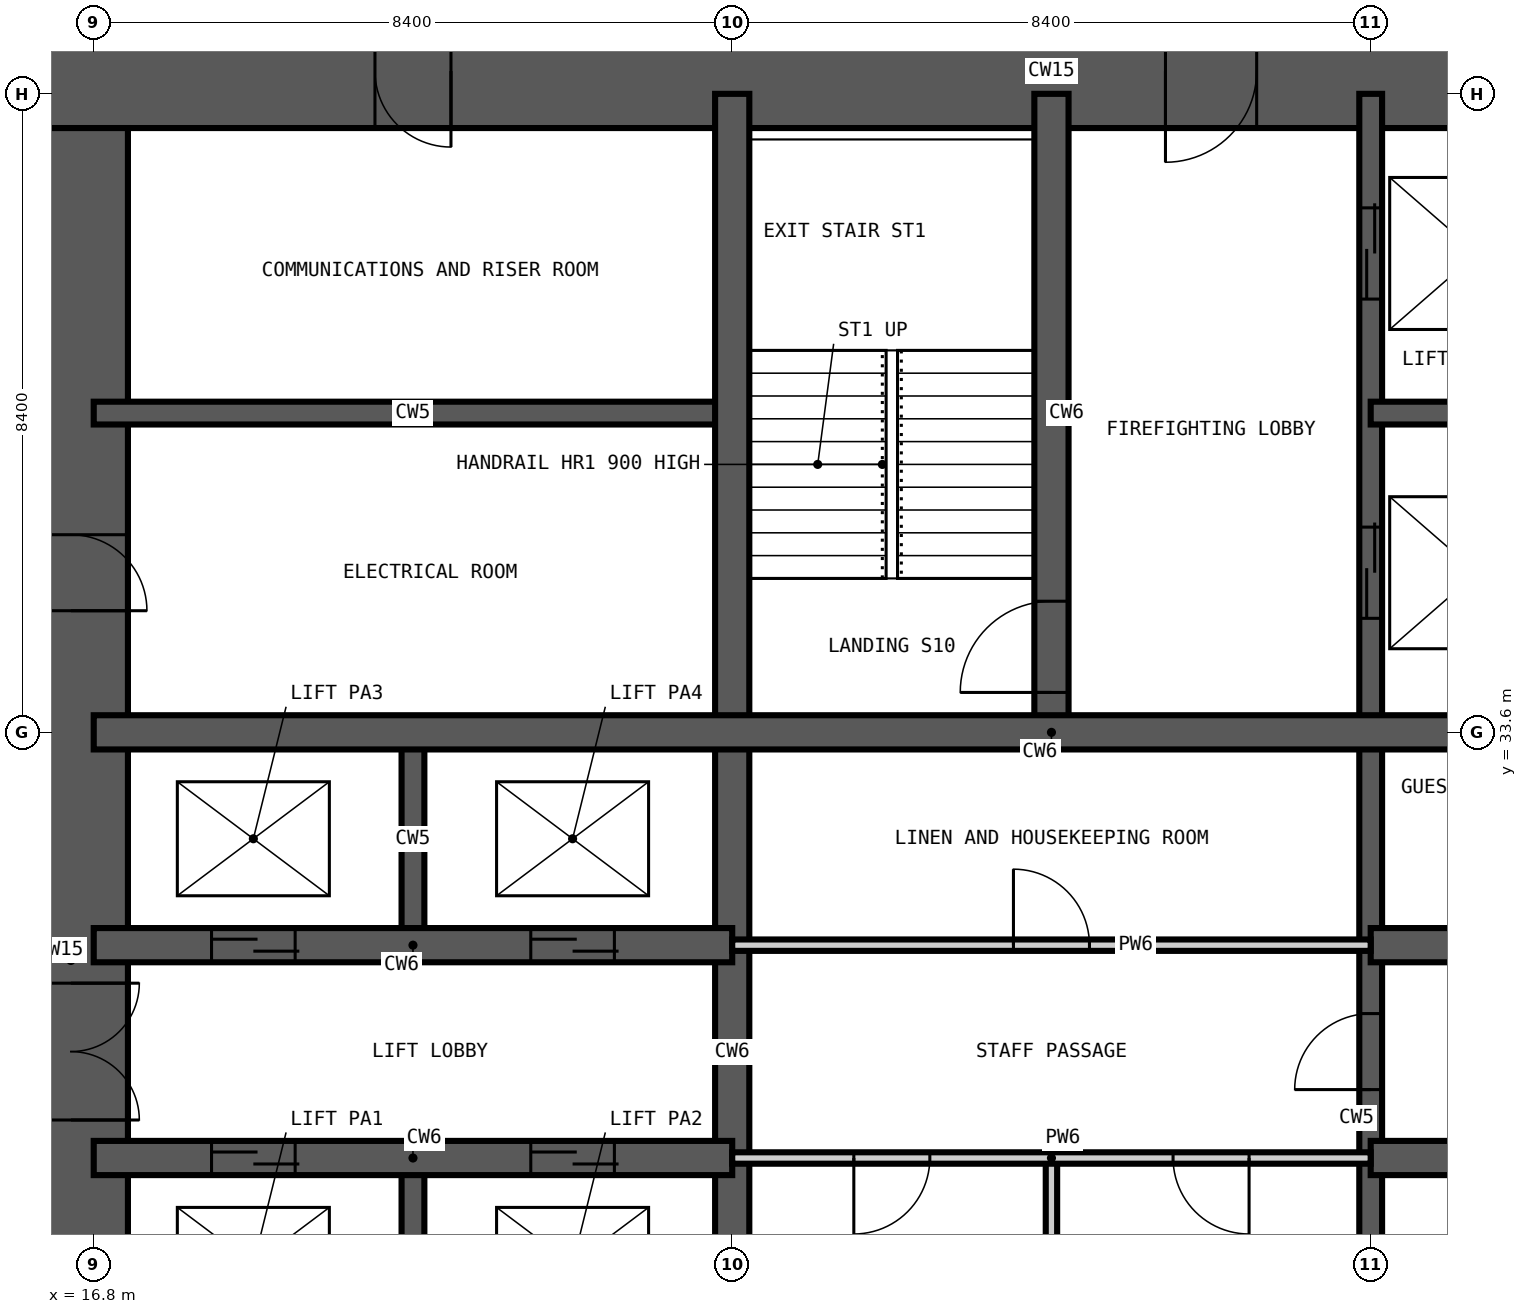
"""IFC4 building model, lengths in metres.
Left out: names, types, materials, properties, quantities, classifications, styles, units other than length and angle.
Written with IfcOpenShell. Run it as: python <this file> out.ifc"""

import sys

from ifc_helpers import new_model, si_unit, direction, frame, frame_2d, origin, place, context, subcontext, project, spatial, rectangle, extrude, element, fill, save


model = new_model("IFC4")
c1 = context("Model", 3, precision=1e-05, world=origin(), true_north=direction((0.0, 1.0)))
c2 = subcontext(c1, "Body", "Model", "MODEL_VIEW")
j1 = project(units=[si_unit("LENGTHUNIT", "METRE"), si_unit("PLANEANGLEUNIT", "RADIAN")], contexts=[c1])
p1 = place(None, origin())
s1 = spatial("IfcSite", under=j1, at=p1, CompositionType="ELEMENT")
p2 = place(p1, origin())
s2 = spatial("IfcBuilding", under=s1, at=p2, CompositionType="ELEMENT")
p3 = place(p2, frame((0.0, 0.0, 70.2)))
s3 = spatial("IfcBuildingStorey", under=s2, at=p3, CompositionType="ELEMENT", Elevation=70.2)
p4 = place(p3, frame((43.05, 42.3, -0.35), z_axis=(0.0, 0.0, 1.0), x_axis=(-1.0, 0.0, 0.0)))
e1 = element("IfcWall", 1, at=p4, inside=s3, PredefinedType="SHEAR", context=c2, shape_type="SweptSolid", body=[
    extrude(rectangle(XDim=27.3, YDim=1.5, at=frame_2d((13.65, 0.0))), origin(), (0.0, 0.0, 1.0), 3.6),
])
p5 = place(p4, frame((21.55, 0.0, 0.35)))
e2 = element("IfcOpeningElement", 2, at=p5, cuts=e1, PredefinedType="OPENING", context=c2, shape_type="SweptSolid", body=[
    extrude(rectangle(XDim=1.0, YDim=2.1, at=frame_2d((0.5, 1.05))), frame((0.0, 0.76, 0.0), z_axis=(0.0, -1.0, 0.0), x_axis=(1.0, 0.0, 0.0)), (0.0, 0.0, 1.0), 1.52),
])
p6 = place(p4, frame((10.95, 0.0, 0.35)))
e3 = element("IfcOpeningElement", 3, at=p6, cuts=e1, PredefinedType="OPENING", context=c2, shape_type="SweptSolid", body=[
    extrude(rectangle(XDim=1.2, YDim=2.2, at=frame_2d((0.6, 1.1))), frame((0.0, 0.76, 0.0), z_axis=(0.0, -1.0, 0.0), x_axis=(1.0, 0.0, 0.0)), (0.0, 0.0, 1.0), 1.52),
])
p7 = place(p3, frame((16.5, 41.55, -0.35), z_axis=(0.0, 0.0, 1.0), x_axis=(0.0, -1.0, 0.0)))
e4 = element("IfcWall", 4, at=p7, inside=s3, PredefinedType="SHEAR", context=c2, shape_type="SweptSolid", body=[
    extrude(rectangle(XDim=24.3, YDim=1.5, at=frame_2d((12.15, 0.0))), origin(), (0.0, 0.0, 1.0), 3.6),
])
p8 = place(p7, frame((11.25, 0.0, 0.35)))
e5 = element("IfcOpeningElement", 5, at=p8, cuts=e4, PredefinedType="OPENING", context=c2, shape_type="SweptSolid", body=[
    extrude(rectangle(XDim=1.8, YDim=2.2, at=frame_2d((0.9, 1.1))), frame((0.0, 0.76, 0.0), z_axis=(0.0, -1.0, 0.0), x_axis=(1.0, 0.0, 0.0)), (0.0, 0.0, 1.0), 1.52),
])
p9 = place(p7, frame((20.05, 0.0, 0.35)))
e6 = element("IfcOpeningElement", 6, at=p9, cuts=e4, PredefinedType="OPENING", context=c2, shape_type="SweptSolid", body=[
    extrude(rectangle(XDim=1.0, YDim=2.1, at=frame_2d((0.5, 1.05))), frame((0.0, 0.76, 0.0), z_axis=(0.0, -1.0, 0.0), x_axis=(1.0, 0.0, 0.0)), (0.0, 0.0, 1.0), 1.52),
])
p10 = place(p7, frame((5.35, 0.0, 0.35)))
e7 = element("IfcOpeningElement", 7, at=p10, cuts=e4, PredefinedType="OPENING", context=c2, shape_type="SweptSolid", body=[
    extrude(rectangle(XDim=1.0, YDim=2.1, at=frame_2d((0.5, 1.05))), frame((0.0, 0.76, 0.0), z_axis=(0.0, -1.0, 0.0), x_axis=(1.0, 0.0, 0.0)), (0.0, 0.0, 1.0), 1.52),
])
p11 = place(p3, frame((21.0, 22.4, -0.35), z_axis=(0.0, 0.0, 1.0), x_axis=(0.0, 1.0, 0.0)))
e8 = element("IfcWall", 8, at=p11, inside=s3, PredefinedType="SHEAR", context=c2, shape_type="SweptSolid", body=[
    extrude(rectangle(XDim=5.6, YDim=0.3, at=frame_2d((2.8, 0.0))), origin(), (0.0, 0.0, 1.0), 3.6),
])
p12 = place(p3, frame((21.0, 30.8, -0.35), z_axis=(0.0, 0.0, 1.0), x_axis=(0.0, 1.0, 0.0)))
e9 = element("IfcWall", 9, at=p12, inside=s3, PredefinedType="SHEAR", context=c2, shape_type="SweptSolid", body=[
    extrude(rectangle(XDim=2.8, YDim=0.3, at=frame_2d((1.4, 0.0))), origin(), (0.0, 0.0, 1.0), 3.6),
])
p13 = place(p3, frame((33.6, 16.8, -0.35), z_axis=(0.0, 0.0, 1.0), x_axis=(0.0, 1.0, 0.0)))
e10 = element("IfcWall", 10, at=p13, inside=s3, PredefinedType="SHEAR", context=c2, shape_type="SweptSolid", body=[
    extrude(rectangle(XDim=25.2, YDim=0.3, at=frame_2d((12.6, 0.0))), origin(), (0.0, 0.0, 1.0), 3.6),
])
p14 = place(p13, frame((22.5, 0.0, 0.35)))
e11 = element("IfcOpeningElement", 11, at=p14, cuts=e10, PredefinedType="OPENING", context=c2, shape_type="SweptSolid", body=[
    extrude(rectangle(XDim=1.2, YDim=2.2, at=frame_2d((0.6, 1.1))), frame((0.0, 0.16, 0.0), z_axis=(0.0, -1.0, 0.0), x_axis=(1.0, 0.0, 0.0)), (0.0, 0.0, 1.0), 0.32),
])
p15 = place(p13, frame((18.3, 0.0, 0.35)))
e12 = element("IfcOpeningElement", 12, at=p15, cuts=e10, PredefinedType="OPENING", context=c2, shape_type="SweptSolid", body=[
    extrude(rectangle(XDim=1.2, YDim=2.2, at=frame_2d((0.6, 1.1))), frame((0.0, 0.16, 0.0), z_axis=(0.0, -1.0, 0.0), x_axis=(1.0, 0.0, 0.0)), (0.0, 0.0, 1.0), 0.32),
])
p16 = place(p13, frame((12.1, 0.0, 0.35)))
e13 = element("IfcOpeningElement", 13, at=p16, cuts=e10, PredefinedType="OPENING", context=c2, shape_type="SweptSolid", body=[
    extrude(rectangle(XDim=1.0, YDim=2.1, at=frame_2d((0.5, 1.05))), frame((0.0, 0.16, 0.0), z_axis=(0.0, -1.0, 0.0), x_axis=(1.0, 0.0, 0.0)), (0.0, 0.0, 1.0), 0.32),
])
p17 = place(p3, frame((16.8, 37.8, -0.35), z_axis=(0.0, 0.0, 1.0), x_axis=(1.0, 0.0, 0.0)))
e14 = element("IfcWall", 14, at=p17, inside=s3, PredefinedType="SHEAR", context=c2, shape_type="SweptSolid", body=[
    extrude(rectangle(XDim=8.4, YDim=0.3, at=frame_2d((4.2, 0.0))), origin(), (0.0, 0.0, 1.0), 3.6),
])
p18 = place(p3, frame((33.6, 37.8, -0.35), z_axis=(0.0, 0.0, 1.0), x_axis=(1.0, 0.0, 0.0)))
e15 = element("IfcWall", 15, at=p18, inside=s3, PredefinedType="SHEAR", context=c2, shape_type="SweptSolid", body=[
    extrude(rectangle(XDim=2.8, YDim=0.3, at=frame_2d((1.4, 0.0))), origin(), (0.0, 0.0, 1.0), 3.6),
])
p19 = place(p3, frame((25.2, 16.8, -0.35), z_axis=(0.0, 0.0, 1.0), x_axis=(0.0, 1.0, 0.0)))
e16 = element("IfcWall", 16, at=p19, inside=s3, PredefinedType="SHEAR", context=c2, shape_type="SweptSolid", body=[
    extrude(rectangle(XDim=25.2, YDim=0.45, at=frame_2d((12.6, 0.0))), origin(), (0.0, 0.0, 1.0), 3.6),
])
p20 = place(p3, frame((29.4, 33.6, -0.35), z_axis=(0.0, 0.0, 1.0), x_axis=(0.0, 1.0, 0.0)))
e17 = element("IfcWall", 17, at=p20, inside=s3, PredefinedType="SHEAR", context=c2, shape_type="SweptSolid", body=[
    extrude(rectangle(XDim=8.4, YDim=0.45, at=frame_2d((4.2, 0.0))), origin(), (0.0, 0.0, 1.0), 3.6),
])
p21 = place(p20, frame((0.525, 0.0, 0.35)))
e18 = element("IfcOpeningElement", 18, at=p21, cuts=e17, PredefinedType="OPENING", context=c2, shape_type="SweptSolid", body=[
    extrude(rectangle(XDim=1.2, YDim=2.2, at=frame_2d((0.6, 1.1))), frame((0.0, 0.235, 0.0), z_axis=(0.0, -1.0, 0.0), x_axis=(1.0, 0.0, 0.0)), (0.0, 0.0, 1.0), 0.47),
])
p22 = place(p3, frame((16.8, 28.0, -0.35), z_axis=(0.0, 0.0, 1.0), x_axis=(1.0, 0.0, 0.0)))
e19 = element("IfcWall", 19, at=p22, inside=s3, PredefinedType="SHEAR", context=c2, shape_type="SweptSolid", body=[
    extrude(rectangle(XDim=8.4, YDim=0.45, at=frame_2d((4.2, 0.0))), origin(), (0.0, 0.0, 1.0), 3.6),
])
p23 = place(p22, frame((1.55, 0.0, 0.35)))
e20 = element("IfcOpeningElement", 20, at=p23, cuts=e19, PredefinedType="OPENING", context=c2, shape_type="SweptSolid", body=[
    extrude(rectangle(XDim=1.1, YDim=2.2, at=frame_2d((0.55, 1.1))), frame((0.0, 0.235, 0.0), z_axis=(0.0, -1.0, 0.0), x_axis=(1.0, 0.0, 0.0)), (0.0, 0.0, 1.0), 0.47),
])
p24 = place(p22, frame((5.75, 0.0, 0.35)))
e21 = element("IfcOpeningElement", 21, at=p24, cuts=e19, PredefinedType="OPENING", context=c2, shape_type="SweptSolid", body=[
    extrude(rectangle(XDim=1.1, YDim=2.2, at=frame_2d((0.55, 1.1))), frame((0.0, 0.235, 0.0), z_axis=(0.0, -1.0, 0.0), x_axis=(1.0, 0.0, 0.0)), (0.0, 0.0, 1.0), 0.47),
])
p25 = place(p3, frame((33.6, 28.0, -0.35), z_axis=(0.0, 0.0, 1.0), x_axis=(1.0, 0.0, 0.0)))
e22 = element("IfcWall", 22, at=p25, inside=s3, PredefinedType="SHEAR", context=c2, shape_type="SweptSolid", body=[
    extrude(rectangle(XDim=8.4, YDim=0.45, at=frame_2d((4.2, 0.0))), origin(), (0.0, 0.0, 1.0), 3.6),
])
p26 = place(p3, frame((16.8, 30.8, -0.35), z_axis=(0.0, 0.0, 1.0), x_axis=(1.0, 0.0, 0.0)))
e23 = element("IfcWall", 23, at=p26, inside=s3, PredefinedType="SHEAR", context=c2, shape_type="SweptSolid", body=[
    extrude(rectangle(XDim=8.4, YDim=0.45, at=frame_2d((4.2, 0.0))), origin(), (0.0, 0.0, 1.0), 3.6),
])
p27 = place(p26, frame((1.55, 0.0, 0.35)))
e24 = element("IfcOpeningElement", 24, at=p27, cuts=e23, PredefinedType="OPENING", context=c2, shape_type="SweptSolid", body=[
    extrude(rectangle(XDim=1.1, YDim=2.2, at=frame_2d((0.55, 1.1))), frame((0.0, 0.235, 0.0), z_axis=(0.0, -1.0, 0.0), x_axis=(1.0, 0.0, 0.0)), (0.0, 0.0, 1.0), 0.47),
])
p28 = place(p26, frame((5.75, 0.0, 0.35)))
e25 = element("IfcOpeningElement", 25, at=p28, cuts=e23, PredefinedType="OPENING", context=c2, shape_type="SweptSolid", body=[
    extrude(rectangle(XDim=1.1, YDim=2.2, at=frame_2d((0.55, 1.1))), frame((0.0, 0.235, 0.0), z_axis=(0.0, -1.0, 0.0), x_axis=(1.0, 0.0, 0.0)), (0.0, 0.0, 1.0), 0.47),
])
p29 = place(p3, frame((33.6, 30.8, -0.35), z_axis=(0.0, 0.0, 1.0), x_axis=(1.0, 0.0, 0.0)))
e26 = element("IfcWall", 26, at=p29, inside=s3, PredefinedType="SHEAR", context=c2, shape_type="SweptSolid", body=[
    extrude(rectangle(XDim=8.4, YDim=0.45, at=frame_2d((4.2, 0.0))), origin(), (0.0, 0.0, 1.0), 3.6),
])
p30 = place(p29, frame((1.6, 0.0, 0.35)))
e27 = element("IfcOpeningElement", 27, at=p30, cuts=e26, PredefinedType="OPENING", context=c2, shape_type="SweptSolid", body=[
    extrude(rectangle(XDim=1.0, YDim=2.1, at=frame_2d((0.5, 1.05))), frame((0.0, 0.235, 0.0), z_axis=(0.0, -1.0, 0.0), x_axis=(1.0, 0.0, 0.0)), (0.0, 0.0, 1.0), 0.47),
])
p31 = place(p29, frame((4.6, 0.0, 0.35)))
e28 = element("IfcOpeningElement", 28, at=p31, cuts=e26, PredefinedType="OPENING", context=c2, shape_type="SweptSolid", body=[
    extrude(rectangle(XDim=1.0, YDim=2.1, at=frame_2d((0.5, 1.05))), frame((0.0, 0.235, 0.0), z_axis=(0.0, -1.0, 0.0), x_axis=(1.0, 0.0, 0.0)), (0.0, 0.0, 1.0), 0.47),
])
p32 = place(p3, frame((16.8, 33.6, -0.35), z_axis=(0.0, 0.0, 1.0), x_axis=(1.0, 0.0, 0.0)))
e29 = element("IfcWall", 29, at=p32, inside=s3, PredefinedType="SHEAR", context=c2, shape_type="SweptSolid", body=[
    extrude(rectangle(XDim=25.2, YDim=0.45, at=frame_2d((12.6, 0.0))), origin(), (0.0, 0.0, 1.0), 3.6),
])
p33 = place(p3, frame((29.4, 25.2, 0.0), z_axis=(0.0, 0.0, 1.0), x_axis=(0.0, 1.0, 0.0)))
e30 = element("IfcWall", 30, at=p33, inside=s3, PredefinedType="PARTITIONING", context=c2, shape_type="SweptSolid", body=[
    extrude(rectangle(XDim=2.8, YDim=0.15, at=frame_2d((1.4, 0.0))), origin(), (0.0, 0.0, 1.0), 3.25),
])
p34 = place(p3, frame((25.2, 28.0, 0.0), z_axis=(0.0, 0.0, 1.0), x_axis=(1.0, 0.0, 0.0)))
e31 = element("IfcWall", 31, at=p34, inside=s3, PredefinedType="PARTITIONING", context=c2, shape_type="SweptSolid", body=[
    extrude(rectangle(XDim=8.4, YDim=0.15, at=frame_2d((4.2, 0.0))), origin(), (0.0, 0.0, 1.0), 3.25),
])
p35 = place(p34, frame((5.8, 0.0, 0.0)))
e32 = element("IfcOpeningElement", 32, at=p35, cuts=e31, PredefinedType="OPENING", context=c2, shape_type="SweptSolid", body=[
    extrude(rectangle(XDim=1.0, YDim=2.1, at=frame_2d((0.5, 1.05))), frame((0.0, 0.085, 0.0), z_axis=(0.0, -1.0, 0.0), x_axis=(1.0, 0.0, 0.0)), (0.0, 0.0, 1.0), 0.17),
])
p36 = place(p34, frame((1.6, 0.0, 0.0)))
e33 = element("IfcOpeningElement", 33, at=p36, cuts=e31, PredefinedType="OPENING", context=c2, shape_type="SweptSolid", body=[
    extrude(rectangle(XDim=1.0, YDim=2.1, at=frame_2d((0.5, 1.05))), frame((0.0, 0.085, 0.0), z_axis=(0.0, -1.0, 0.0), x_axis=(1.0, 0.0, 0.0)), (0.0, 0.0, 1.0), 0.17),
])
p37 = place(p3, frame((25.2, 30.8, 0.0), z_axis=(0.0, 0.0, 1.0), x_axis=(1.0, 0.0, 0.0)))
e34 = element("IfcWall", 34, at=p37, inside=s3, PredefinedType="PARTITIONING", context=c2, shape_type="SweptSolid", body=[
    extrude(rectangle(XDim=8.4, YDim=0.15, at=frame_2d((4.2, 0.0))), origin(), (0.0, 0.0, 1.0), 3.25),
])
p38 = place(p37, frame((3.7, 0.0, 0.0)))
e35 = element("IfcOpeningElement", 35, at=p38, cuts=e34, PredefinedType="OPENING", context=c2, shape_type="SweptSolid", body=[
    extrude(rectangle(XDim=1.0, YDim=2.1, at=frame_2d((0.5, 1.05))), frame((0.0, 0.085, 0.0), z_axis=(0.0, -1.0, 0.0), x_axis=(1.0, 0.0, 0.0)), (0.0, 0.0, 1.0), 0.17),
])
p39 = place(p21, origin())
e36 = element("IfcDoor", 36, at=p39, inside=s3, OperationType="SINGLE_SWING_LEFT", PredefinedType="DOOR", context=c2, shape_type="SweptSolid", body=[
    extrude(rectangle(XDim=1.2, YDim=2.2, at=frame_2d((0.6, 1.1))), frame((0.0, 0.025, 0.0), z_axis=(0.0, -1.0, 0.0), x_axis=(1.0, 0.0, 0.0)), (0.0, 0.0, 1.0), 0.05),
])
fill(e18, e36)
p40 = place(p23, origin())
e37 = element("IfcDoor", 37, at=p40, inside=s3, OperationType="DOUBLE_DOOR_SLIDING", PredefinedType="DOOR", context=c2, shape_type="SweptSolid", body=[
    extrude(rectangle(XDim=1.1, YDim=2.2, at=frame_2d((0.55, 1.1))), frame((0.0, 0.025, 0.0), z_axis=(0.0, -1.0, 0.0), x_axis=(1.0, 0.0, 0.0)), (0.0, 0.0, 1.0), 0.05),
])
fill(e20, e37)
p41 = place(p24, origin())
e38 = element("IfcDoor", 38, at=p41, inside=s3, OperationType="DOUBLE_DOOR_SLIDING", PredefinedType="DOOR", context=c2, shape_type="SweptSolid", body=[
    extrude(rectangle(XDim=1.1, YDim=2.2, at=frame_2d((0.55, 1.1))), frame((0.0, 0.025, 0.0), z_axis=(0.0, -1.0, 0.0), x_axis=(1.0, 0.0, 0.0)), (0.0, 0.0, 1.0), 0.05),
])
fill(e21, e38)
p42 = place(p27, origin())
e39 = element("IfcDoor", 39, at=p42, inside=s3, OperationType="DOUBLE_DOOR_SLIDING", PredefinedType="DOOR", context=c2, shape_type="SweptSolid", body=[
    extrude(rectangle(XDim=1.1, YDim=2.2, at=frame_2d((0.55, 1.1))), frame((0.0, 0.025, 0.0), z_axis=(0.0, -1.0, 0.0), x_axis=(1.0, 0.0, 0.0)), (0.0, 0.0, 1.0), 0.05),
])
fill(e24, e39)
p43 = place(p28, origin())
e40 = element("IfcDoor", 40, at=p43, inside=s3, OperationType="DOUBLE_DOOR_SLIDING", PredefinedType="DOOR", context=c2, shape_type="SweptSolid", body=[
    extrude(rectangle(XDim=1.1, YDim=2.2, at=frame_2d((0.55, 1.1))), frame((0.0, 0.025, 0.0), z_axis=(0.0, -1.0, 0.0), x_axis=(1.0, 0.0, 0.0)), (0.0, 0.0, 1.0), 0.05),
])
fill(e25, e40)
p44 = place(p14, origin())
e41 = element("IfcDoor", 41, at=p44, inside=s3, OperationType="DOUBLE_DOOR_SLIDING", PredefinedType="DOOR", context=c2, shape_type="SweptSolid", body=[
    extrude(rectangle(XDim=1.2, YDim=2.2, at=frame_2d((0.6, 1.1))), frame((0.0, 0.025, 0.0), z_axis=(0.0, -1.0, 0.0), x_axis=(1.0, 0.0, 0.0)), (0.0, 0.0, 1.0), 0.05),
])
fill(e11, e41)
p45 = place(p15, origin())
e42 = element("IfcDoor", 42, at=p45, inside=s3, OperationType="DOUBLE_DOOR_SLIDING", PredefinedType="DOOR", context=c2, shape_type="SweptSolid", body=[
    extrude(rectangle(XDim=1.2, YDim=2.2, at=frame_2d((0.6, 1.1))), frame((0.0, 0.025, 0.0), z_axis=(0.0, -1.0, 0.0), x_axis=(1.0, 0.0, 0.0)), (0.0, 0.0, 1.0), 0.05),
])
fill(e12, e42)
p46 = place(p8, origin())
e43 = element("IfcDoor", 43, at=p46, inside=s3, OperationType="DOUBLE_DOOR_DOUBLE_SWING", PredefinedType="DOOR", context=c2, shape_type="SweptSolid", body=[
    extrude(rectangle(XDim=1.8, YDim=2.2, at=frame_2d((0.9, 1.1))), frame((0.0, 0.025, 0.0), z_axis=(0.0, -1.0, 0.0), x_axis=(1.0, 0.0, 0.0)), (0.0, 0.0, 1.0), 0.05),
])
fill(e5, e43)
p47 = place(p10, origin())
e44 = element("IfcDoor", 44, at=p47, inside=s3, OperationType="SINGLE_SWING_RIGHT", PredefinedType="DOOR", context=c2, shape_type="SweptSolid", body=[
    extrude(rectangle(XDim=1.0, YDim=2.1, at=frame_2d((0.5, 1.05))), frame((0.0, 0.025, 0.0), z_axis=(0.0, -1.0, 0.0), x_axis=(1.0, 0.0, 0.0)), (0.0, 0.0, 1.0), 0.05),
])
fill(e7, e44)
p48 = place(p5, origin())
e45 = element("IfcDoor", 45, at=p48, inside=s3, OperationType="SINGLE_SWING_LEFT", PredefinedType="DOOR", context=c2, shape_type="SweptSolid", body=[
    extrude(rectangle(XDim=1.0, YDim=2.1, at=frame_2d((0.5, 1.05))), frame((0.0, 0.025, 0.0), z_axis=(0.0, -1.0, 0.0), x_axis=(1.0, 0.0, 0.0)), (0.0, 0.0, 1.0), 0.05),
])
fill(e2, e45)
p49 = place(p16, origin())
e46 = element("IfcDoor", 46, at=p49, inside=s3, OperationType="SINGLE_SWING_LEFT", PredefinedType="DOOR", context=c2, shape_type="SweptSolid", body=[
    extrude(rectangle(XDim=1.0, YDim=2.1, at=frame_2d((0.5, 1.05))), frame((0.0, 0.025, 0.0), z_axis=(0.0, -1.0, 0.0), x_axis=(1.0, 0.0, 0.0)), (0.0, 0.0, 1.0), 0.05),
])
fill(e13, e46)
p50 = place(p35, frame((1.0, 0.0, 0.0), z_axis=(0.0, 0.0, 1.0), x_axis=(-1.0, 0.0, 0.0)))
e47 = element("IfcDoor", 47, at=p50, inside=s3, OperationType="SINGLE_SWING_LEFT", PredefinedType="DOOR", context=c2, shape_type="SweptSolid", body=[
    extrude(rectangle(XDim=1.0, YDim=2.1, at=frame_2d((0.5, 1.05))), frame((0.0, 0.025, 0.0), z_axis=(0.0, -1.0, 0.0), x_axis=(1.0, 0.0, 0.0)), (0.0, 0.0, 1.0), 0.05),
])
fill(e32, e47)
p51 = place(p36, frame((1.0, 0.0, 0.0), z_axis=(0.0, 0.0, 1.0), x_axis=(-1.0, 0.0, 0.0)))
e48 = element("IfcDoor", 48, at=p51, inside=s3, OperationType="SINGLE_SWING_RIGHT", PredefinedType="DOOR", context=c2, shape_type="SweptSolid", body=[
    extrude(rectangle(XDim=1.0, YDim=2.1, at=frame_2d((0.5, 1.05))), frame((0.0, 0.025, 0.0), z_axis=(0.0, -1.0, 0.0), x_axis=(1.0, 0.0, 0.0)), (0.0, 0.0, 1.0), 0.05),
])
fill(e33, e48)
p52 = place(p38, origin())
e49 = element("IfcDoor", 49, at=p52, inside=s3, OperationType="SINGLE_SWING_LEFT", PredefinedType="DOOR", context=c2, shape_type="SweptSolid", body=[
    extrude(rectangle(XDim=1.0, YDim=2.1, at=frame_2d((0.5, 1.05))), frame((0.0, 0.025, 0.0), z_axis=(0.0, -1.0, 0.0), x_axis=(1.0, 0.0, 0.0)), (0.0, 0.0, 1.0), 0.05),
])
fill(e35, e49)
p53 = place(p6, origin())
e50 = element("IfcDoor", 50, at=p53, inside=s3, OperationType="SINGLE_SWING_RIGHT", PredefinedType="DOOR", context=c2, shape_type="SweptSolid", body=[
    extrude(rectangle(XDim=1.2, YDim=2.2, at=frame_2d((0.6, 1.1))), frame((0.0, 0.025, 0.0), z_axis=(0.0, -1.0, 0.0), x_axis=(1.0, 0.0, 0.0)), (0.0, 0.0, 1.0), 0.05),
])
fill(e3, e50)
save(model, sys.argv[1])
